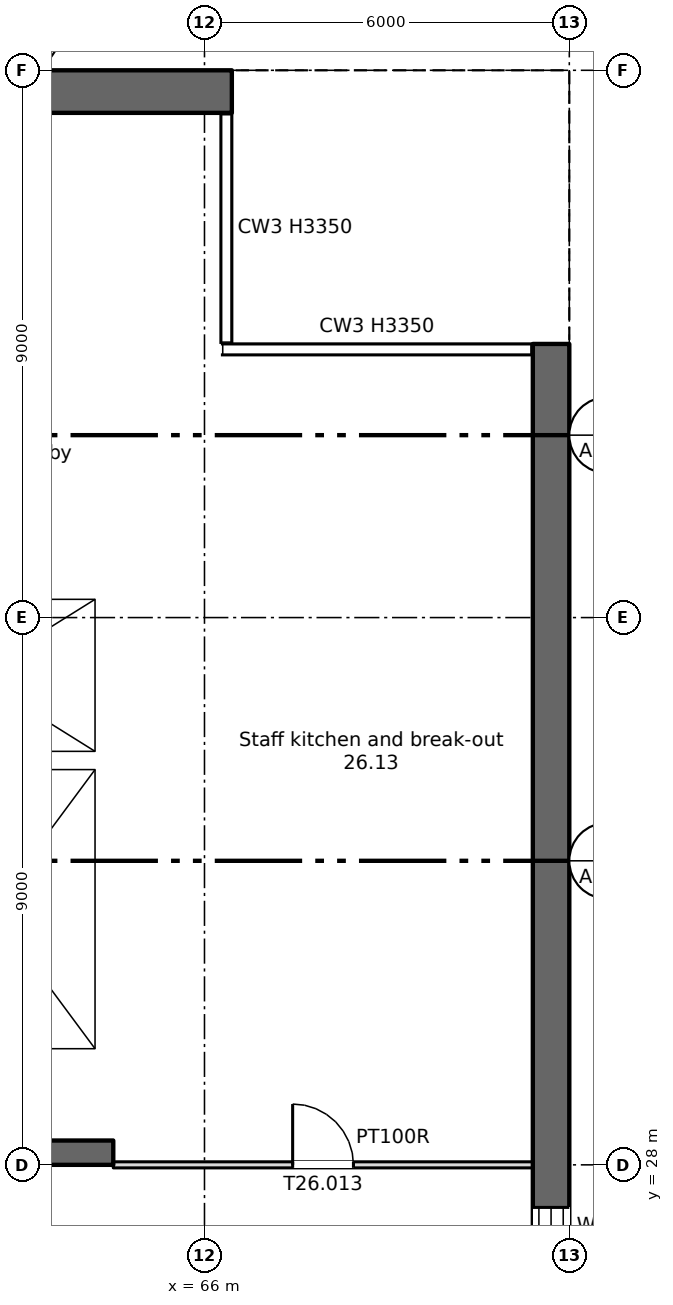
"""IFC4 building model, lengths in metres.
Left out: names, types, materials, properties, quantities, classifications, styles, units other than length and angle.
Written with IfcOpenShell. Run it as: python <this file> out.ifc"""

import sys

from ifc_helpers import new_model, si_unit, direction, frame, frame_2d, origin, place, context, subcontext, project, spatial, rectangle, extrude, element, fill, save


model = new_model("IFC4")
c1 = context("Model", 3, precision=1e-05, world=origin(), true_north=direction((0.0, 1.0)))
c2 = subcontext(c1, "Body", "Model", "MODEL_VIEW")
j1 = project(units=[si_unit("LENGTHUNIT", "METRE"), si_unit("PLANEANGLEUNIT", "RADIAN")], contexts=[c1])
p1 = place(None, origin())
s1 = spatial("IfcSite", under=j1, at=p1, CompositionType="ELEMENT")
p2 = place(p1, origin())
s2 = spatial("IfcBuilding", under=s1, at=p2, CompositionType="ELEMENT")
p3 = place(p2, frame((0.0, 0.0, 178.0)))
s3 = spatial("IfcBuildingStorey", under=s2, at=p3, CompositionType="ELEMENT", Elevation=178.0)
p4 = place(p3, frame((71.7, 7.5, 0.0), z_axis=(0.0, 0.0, 1.0), x_axis=(0.0, 1.0, 0.0)))
e1 = element("IfcWall", 1, at=p4, inside=s3, PredefinedType="SHEAR", context=c2, shape_type="SweptSolid", body=[
    extrude(rectangle(XDim=34.0, YDim=0.6, at=frame_2d((17.0, 0.0))), origin(), (0.0, 0.0, 1.0), 3.35),
])
p5 = place(p4, frame((1.2, 0.0, 0.6)))
e2 = element("IfcOpeningElement", 2, at=p5, cuts=e1, PredefinedType="OPENING", context=c2, shape_type="SweptSolid", body=[
    extrude(rectangle(XDim=0.6, YDim=2.4, at=frame_2d((0.3, 1.2))), frame((0.0, 0.31, 0.0), z_axis=(0.0, -1.0, 0.0), x_axis=(1.0, 0.0, 0.0)), (0.0, 0.0, 1.0), 0.62),
])
p6 = place(p4, frame((7.2, 0.0, 0.6)))
e3 = element("IfcOpeningElement", 3, at=p6, cuts=e1, PredefinedType="OPENING", context=c2, shape_type="SweptSolid", body=[
    extrude(rectangle(XDim=0.6, YDim=2.4, at=frame_2d((0.3, 1.2))), frame((0.0, 0.31, 0.0), z_axis=(0.0, -1.0, 0.0), x_axis=(1.0, 0.0, 0.0)), (0.0, 0.0, 1.0), 0.62),
])
p7 = place(p4, frame((13.2, 0.0, 0.6)))
e4 = element("IfcOpeningElement", 4, at=p7, cuts=e1, PredefinedType="OPENING", context=c2, shape_type="SweptSolid", body=[
    extrude(rectangle(XDim=0.6, YDim=2.4, at=frame_2d((0.3, 1.2))), frame((0.0, 0.31, 0.0), z_axis=(0.0, -1.0, 0.0), x_axis=(1.0, 0.0, 0.0)), (0.0, 0.0, 1.0), 0.62),
])
p8 = place(p4, frame((19.2, 0.0, 0.6)))
e5 = element("IfcOpeningElement", 5, at=p8, cuts=e1, PredefinedType="OPENING", context=c2, shape_type="SweptSolid", body=[
    extrude(rectangle(XDim=0.6, YDim=2.4, at=frame_2d((0.3, 1.2))), frame((0.0, 0.31, 0.0), z_axis=(0.0, -1.0, 0.0), x_axis=(1.0, 0.0, 0.0)), (0.0, 0.0, 1.0), 0.62),
])
p9 = place(p3, frame((11.55, 45.65, 0.0), z_axis=(0.0, 0.0, 1.0), x_axis=(1.0, 0.0, 0.0)))
e6 = element("IfcWall", 6, at=p9, inside=s3, PredefinedType="SHEAR", context=c2, shape_type="SweptSolid", body=[
    extrude(rectangle(XDim=54.9, YDim=0.7, at=frame_2d((27.45, 0.0))), origin(), (0.0, 0.0, 1.0), 3.35),
])
p10 = place(p9, frame((1.2, 0.0, 0.6)))
e7 = element("IfcOpeningElement", 7, at=p10, cuts=e6, PredefinedType="OPENING", context=c2, shape_type="SweptSolid", body=[
    extrude(rectangle(XDim=0.6, YDim=2.4, at=frame_2d((0.3, 1.2))), frame((0.0, 0.36, 0.0), z_axis=(0.0, -1.0, 0.0), x_axis=(1.0, 0.0, 0.0)), (0.0, 0.0, 1.0), 0.72),
])
p11 = place(p3, frame((6.6, 28.2, 0.0), z_axis=(0.0, 0.0, 1.0), x_axis=(1.0, 0.0, 0.0)))
e8 = element("IfcWall", 8, at=p11, inside=s3, PredefinedType="SHEAR", context=c2, shape_type="SweptSolid", body=[
    extrude(rectangle(XDim=57.9, YDim=0.4, at=frame_2d((28.95, 0.0))), origin(), (0.0, 0.0, 1.0), 3.35),
])
p12 = place(p11, frame((12.163, 0.0, 0.0)))
e9 = element("IfcOpeningElement", 9, at=p12, cuts=e8, PredefinedType="OPENING", context=c2, shape_type="SweptSolid", body=[
    extrude(rectangle(XDim=0.9, YDim=2.1, at=frame_2d((0.45, 1.05))), frame((0.0, 0.21, 0.0), z_axis=(0.0, -1.0, 0.0), x_axis=(1.0, 0.0, 0.0)), (0.0, 0.0, 1.0), 0.42),
])
p13 = place(p11, frame((14.738, 0.0, 0.0)))
e10 = element("IfcOpeningElement", 10, at=p13, cuts=e8, PredefinedType="OPENING", context=c2, shape_type="SweptSolid", body=[
    extrude(rectangle(XDim=0.9, YDim=2.1, at=frame_2d((0.45, 1.05))), frame((0.0, 0.21, 0.0), z_axis=(0.0, -1.0, 0.0), x_axis=(1.0, 0.0, 0.0)), (0.0, 0.0, 1.0), 0.42),
])
p14 = place(p11, frame((49.163, 0.0, 0.0)))
e11 = element("IfcOpeningElement", 11, at=p14, cuts=e8, PredefinedType="OPENING", context=c2, shape_type="SweptSolid", body=[
    extrude(rectangle(XDim=0.9, YDim=2.1, at=frame_2d((0.45, 1.05))), frame((0.0, 0.21, 0.0), z_axis=(0.0, -1.0, 0.0), x_axis=(1.0, 0.0, 0.0)), (0.0, 0.0, 1.0), 0.42),
])
p15 = place(p11, frame((51.738, 0.0, 0.0)))
e12 = element("IfcOpeningElement", 12, at=p15, cuts=e8, PredefinedType="OPENING", context=c2, shape_type="SweptSolid", body=[
    extrude(rectangle(XDim=0.9, YDim=2.1, at=frame_2d((0.45, 1.05))), frame((0.0, 0.21, 0.0), z_axis=(0.0, -1.0, 0.0), x_axis=(1.0, 0.0, 0.0)), (0.0, 0.0, 1.0), 0.42),
])
p16 = place(p11, frame((1.45, 0.0, 0.0)))
e13 = element("IfcOpeningElement", 13, at=p16, cuts=e8, PredefinedType="OPENING", context=c2, shape_type="SweptSolid", body=[
    extrude(rectangle(XDim=0.9, YDim=2.1, at=frame_2d((0.45, 1.05))), frame((0.0, 0.21, 0.0), z_axis=(0.0, -1.0, 0.0), x_axis=(1.0, 0.0, 0.0)), (0.0, 0.0, 1.0), 0.42),
])
p17 = place(p11, frame((4.8, 0.0, 0.0)))
e14 = element("IfcOpeningElement", 14, at=p17, cuts=e8, PredefinedType="OPENING", context=c2, shape_type="SweptSolid", body=[
    extrude(rectangle(XDim=1.2, YDim=2.1, at=frame_2d((0.6, 1.05))), frame((0.0, 0.21, 0.0), z_axis=(0.0, -1.0, 0.0), x_axis=(1.0, 0.0, 0.0)), (0.0, 0.0, 1.0), 0.42),
])
p18 = place(p11, frame((31.8, 0.0, 0.0)))
e15 = element("IfcOpeningElement", 15, at=p18, cuts=e8, PredefinedType="OPENING", context=c2, shape_type="SweptSolid", body=[
    extrude(rectangle(XDim=1.2, YDim=2.1, at=frame_2d((0.6, 1.05))), frame((0.0, 0.21, 0.0), z_axis=(0.0, -1.0, 0.0), x_axis=(1.0, 0.0, 0.0)), (0.0, 0.0, 1.0), 0.42),
])
p19 = place(p11, frame((55.3, 0.0, 0.0)))
e16 = element("IfcOpeningElement", 16, at=p19, cuts=e8, PredefinedType="OPENING", context=c2, shape_type="SweptSolid", body=[
    extrude(rectangle(XDim=1.2, YDim=2.1, at=frame_2d((0.6, 1.05))), frame((0.0, 0.21, 0.0), z_axis=(0.0, -1.0, 0.0), x_axis=(1.0, 0.0, 0.0)), (0.0, 0.0, 1.0), 0.42),
])
p20 = place(p11, frame((21.8, 0.0, 0.0)))
e17 = element("IfcOpeningElement", 17, at=p20, cuts=e8, PredefinedType="OPENING", context=c2, shape_type="SweptSolid", body=[
    extrude(rectangle(XDim=1.2, YDim=2.1, at=frame_2d((0.6, 1.05))), frame((0.0, 0.21, 0.0), z_axis=(0.0, -1.0, 0.0), x_axis=(1.0, 0.0, 0.0)), (0.0, 0.0, 1.0), 0.42),
])
p21 = place(p11, frame((41.8, 0.0, 0.0)))
e18 = element("IfcOpeningElement", 18, at=p21, cuts=e8, PredefinedType="OPENING", context=c2, shape_type="SweptSolid", body=[
    extrude(rectangle(XDim=1.2, YDim=2.1, at=frame_2d((0.6, 1.05))), frame((0.0, 0.21, 0.0), z_axis=(0.0, -1.0, 0.0), x_axis=(1.0, 0.0, 0.0)), (0.0, 0.0, 1.0), 0.42),
])
p22 = place(p11, frame((24.95, 0.0, 0.0)))
e19 = element("IfcOpeningElement", 19, at=p22, cuts=e8, PredefinedType="OPENING", context=c2, shape_type="SweptSolid", body=[
    extrude(rectangle(XDim=2.4, YDim=2.1, at=frame_2d((1.2, 1.05))), frame((0.0, 0.21, 0.0), z_axis=(0.0, -1.0, 0.0), x_axis=(1.0, 0.0, 0.0)), (0.0, 0.0, 1.0), 0.42),
])
p23 = place(p11, frame((37.45, 0.0, 0.0)))
e20 = element("IfcOpeningElement", 20, at=p23, cuts=e8, PredefinedType="OPENING", context=c2, shape_type="SweptSolid", body=[
    extrude(rectangle(XDim=2.4, YDim=2.1, at=frame_2d((1.2, 1.05))), frame((0.0, 0.21, 0.0), z_axis=(0.0, -1.0, 0.0), x_axis=(1.0, 0.0, 0.0)), (0.0, 0.0, 1.0), 0.42),
])
p24 = place(p11, frame((8.1, 0.0, 0.0)))
e21 = element("IfcOpeningElement", 21, at=p24, cuts=e8, PredefinedType="OPENING", context=c2, shape_type="SweptSolid", body=[
    extrude(rectangle(XDim=2.4, YDim=2.1, at=frame_2d((1.2, 1.05))), frame((0.0, 0.21, 0.0), z_axis=(0.0, -1.0, 0.0), x_axis=(1.0, 0.0, 0.0)), (0.0, 0.0, 1.0), 0.42),
])
p25 = place(p11, frame((28.95, 0.0, 0.0)))
e22 = element("IfcOpeningElement", 22, at=p25, cuts=e8, PredefinedType="OPENING", context=c2, shape_type="SweptSolid", body=[
    extrude(rectangle(XDim=0.9, YDim=2.1, at=frame_2d((0.45, 1.05))), frame((0.0, 0.21, 0.0), z_axis=(0.0, -1.0, 0.0), x_axis=(1.0, 0.0, 0.0)), (0.0, 0.0, 1.0), 0.42),
])
p26 = place(p11, frame((34.95, 0.0, 0.0)))
e23 = element("IfcOpeningElement", 23, at=p26, cuts=e8, PredefinedType="OPENING", context=c2, shape_type="SweptSolid", body=[
    extrude(rectangle(XDim=0.9, YDim=2.1, at=frame_2d((0.45, 1.05))), frame((0.0, 0.21, 0.0), z_axis=(0.0, -1.0, 0.0), x_axis=(1.0, 0.0, 0.0)), (0.0, 0.0, 1.0), 0.42),
])
p27 = place(p3, frame((64.35, 34.8, 0.0), z_axis=(0.0, 0.0, 1.0), x_axis=(0.0, 1.0, 0.0)))
e24 = element("IfcWall", 24, at=p27, inside=s3, PredefinedType="SHEAR", context=c2, shape_type="SweptSolid", body=[
    extrude(rectangle(XDim=10.5, YDim=0.3, at=frame_2d((5.25, 0.0))), origin(), (0.0, 0.0, 1.0), 3.35),
])
p28 = place(p3, frame((64.35, 28.4, 0.0), z_axis=(0.0, 0.0, 1.0), x_axis=(0.0, 1.0, 0.0)))
e25 = element("IfcWall", 25, at=p28, inside=s3, PredefinedType="SHEAR", context=c2, shape_type="SweptSolid", body=[
    extrude(rectangle(XDim=6.1, YDim=0.3, at=frame_2d((3.05, 0.0))), origin(), (0.0, 0.0, 1.0), 3.35),
])
p29 = place(p3, frame((60.2, 34.65, 0.0), z_axis=(0.0, 0.0, 1.0), x_axis=(1.0, 0.0, 0.0)))
e26 = element("IfcWall", 26, at=p29, inside=s3, PredefinedType="SHEAR", context=c2, shape_type="SweptSolid", body=[
    extrude(rectangle(XDim=4.3, YDim=0.3, at=frame_2d((2.15, 0.0))), origin(), (0.0, 0.0, 1.0), 3.35),
])
p30 = place(p3, frame((60.2, 37.45, 0.0), z_axis=(0.0, 0.0, 1.0), x_axis=(1.0, 0.0, 0.0)))
e27 = element("IfcWall", 27, at=p30, inside=s3, PredefinedType="SHEAR", context=c2, shape_type="SweptSolid", body=[
    extrude(rectangle(XDim=4.0, YDim=0.3, at=frame_2d((2.0, 0.0))), origin(), (0.0, 0.0, 1.0), 3.35),
])
p31 = place(p30, frame((1.45, 0.0, 0.0)))
e28 = element("IfcOpeningElement", 28, at=p31, cuts=e27, PredefinedType="OPENING", context=c2, shape_type="SweptSolid", body=[
    extrude(rectangle(XDim=1.1, YDim=2.1, at=frame_2d((0.55, 1.05))), frame((0.0, 0.16, 0.0), z_axis=(0.0, -1.0, 0.0), x_axis=(1.0, 0.0, 0.0)), (0.0, 0.0, 1.0), 0.32),
])
p32 = place(p3, frame((64.5, 28.0, 0.0), z_axis=(0.0, 0.0, 1.0), x_axis=(1.0, 0.0, 0.0)))
e29 = element("IfcWall", 29, at=p32, inside=s3, PredefinedType="PARTITIONING", context=c2, shape_type="SweptSolid", body=[
    extrude(rectangle(XDim=6.9, YDim=0.1, at=frame_2d((3.45, 0.0))), origin(), (0.0, 0.0, 1.0), 3.35),
])
p33 = place(p32, frame((2.95, 0.0, 0.0)))
e30 = element("IfcOpeningElement", 30, at=p33, cuts=e29, PredefinedType="OPENING", context=c2, shape_type="SweptSolid", body=[
    extrude(rectangle(XDim=1.0, YDim=2.1, at=frame_2d((0.5, 1.05))), frame((0.0, 0.06, 0.0), z_axis=(0.0, -1.0, 0.0), x_axis=(1.0, 0.0, 0.0)), (0.0, 0.0, 1.0), 0.12),
])
p34 = place(p8, origin())
e31 = element("IfcWindow", 31, at=p34, inside=s3, PartitioningType="SINGLE_PANEL", PredefinedType="WINDOW", context=c2, shape_type="SweptSolid", body=[
    extrude(rectangle(XDim=0.6, YDim=2.4, at=frame_2d((0.3, 1.2))), frame((0.0, 0.03, 0.0), z_axis=(0.0, -1.0, 0.0), x_axis=(1.0, 0.0, 0.0)), (0.0, 0.0, 1.0), 0.06),
])
fill(e5, e31)
p35 = place(p33, origin())
e32 = element("IfcDoor", 32, at=p35, inside=s3, OperationType="SINGLE_SWING_LEFT", PredefinedType="DOOR", context=c2, shape_type="SweptSolid", body=[
    extrude(rectangle(XDim=1.0, YDim=2.1, at=frame_2d((0.5, 1.05))), frame((0.0, 0.025, 0.0), z_axis=(0.0, -1.0, 0.0), x_axis=(1.0, 0.0, 0.0)), (0.0, 0.0, 1.0), 0.05),
])
fill(e30, e32)
save(model, sys.argv[1])
